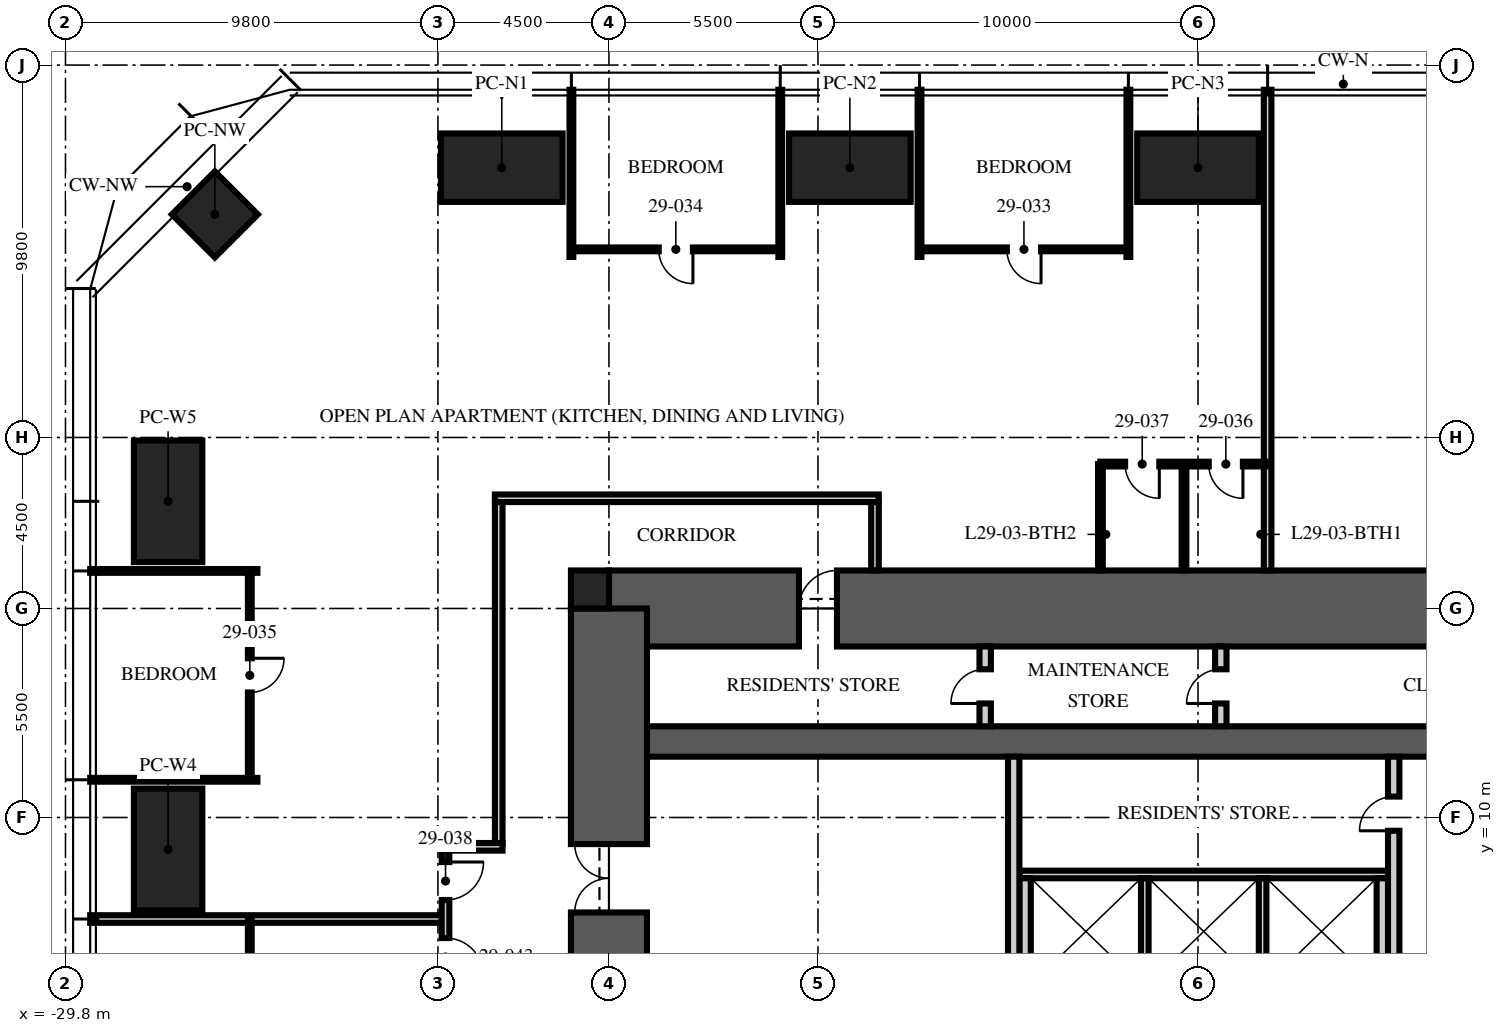
"""IFC4 building model, lengths in metres.
Left out: names, types, materials, properties, quantities, classifications, styles, units other than length and angle.
Written with IfcOpenShell. Run it as: python <this file> out.ifc"""

import sys

from ifc_helpers import new_model, si_unit, direction, frame, frame_2d, origin, origin_2d, place, context, subcontext, project, spatial, rectangle, hollow_rectangle, extrude, element, fill, save


model = new_model("IFC4")
c1 = context("Model", 3, precision=1e-05, world=origin(), true_north=direction((0.0, 1.0)))
c2 = subcontext(c1, "Body", "Model", "MODEL_VIEW")
j1 = project(units=[si_unit("LENGTHUNIT", "METRE"), si_unit("PLANEANGLEUNIT", "RADIAN")], contexts=[c1])
p1 = place(None, origin())
s1 = spatial("IfcSite", under=j1, at=p1, CompositionType="ELEMENT")
p2 = place(p1, origin())
s2 = spatial("IfcBuilding", under=s1, at=p2, CompositionType="ELEMENT")
p3 = place(p2, frame((0.0, 0.0, 118.5)))
s3 = spatial("IfcBuildingStorey", under=s2, at=p3, CompositionType="ELEMENT", Elevation=118.5)
p4 = place(p3, frame((-15.5, 15.5, -0.25), z_axis=(0.0, 0.0, 1.0), x_axis=(1.0, 0.0, 0.0)))
e1 = element("IfcWall", 1, at=p4, inside=s3, PredefinedType="SHEAR", context=c2, shape_type="SweptSolid", body=[
    extrude(rectangle(XDim=31.0, YDim=2.0, at=frame_2d((15.5, 0.0))), origin(), (0.0, 0.0, 1.0), 3.75),
])
p5 = place(p4, frame((5.0, 0.0, 0.25)))
e2 = element("IfcOpeningElement", 2, at=p5, cuts=e1, PredefinedType="OPENING", context=c2, shape_type="SweptSolid", body=[
    extrude(rectangle(XDim=1.0, YDim=2.1, at=frame_2d((0.5, 1.05))), frame((0.0, 1.01, 0.0), z_axis=(0.0, -1.0, 0.0), x_axis=(1.0, 0.0, 0.0)), (0.0, 0.0, 1.0), 2.02),
])
p6 = place(p3, frame((-15.5, 12.0, -0.25), z_axis=(0.0, 0.0, 1.0), x_axis=(1.0, 0.0, 0.0)))
e3 = element("IfcWall", 3, at=p6, inside=s3, PredefinedType="SHEAR", context=c2, shape_type="SweptSolid", body=[
    extrude(rectangle(XDim=31.0, YDim=0.8, at=frame_2d((15.5, 0.0))), origin(), (0.0, 0.0, 1.0), 3.75),
])
p7 = place(p3, frame((-15.5, -15.5, -0.25), z_axis=(0.0, 0.0, 1.0), x_axis=(0.0, 1.0, 0.0)))
e4 = element("IfcWall", 4, at=p7, inside=s3, PredefinedType="SHEAR", context=c2, shape_type="SweptSolid", body=[
    extrude(rectangle(XDim=31.0, YDim=2.0, at=frame_2d((15.5, 0.0))), origin(), (0.0, 0.0, 1.0), 3.75),
])
p8 = place(p7, frame((6.5, 0.0, 0.25)))
e5 = element("IfcOpeningElement", 5, at=p8, cuts=e4, PredefinedType="OPENING", context=c2, shape_type="SweptSolid", body=[
    extrude(rectangle(XDim=1.2, YDim=2.1, at=frame_2d((0.6, 1.05))), frame((0.0, 1.01, 0.0), z_axis=(0.0, -1.0, 0.0), x_axis=(1.0, 0.0, 0.0)), (0.0, 0.0, 1.0), 2.02),
])
p9 = place(p7, frame((23.0, 0.0, 0.25)))
e6 = element("IfcOpeningElement", 6, at=p9, cuts=e4, PredefinedType="OPENING", context=c2, shape_type="SweptSolid", body=[
    extrude(rectangle(XDim=1.8, YDim=2.1, at=frame_2d((0.9, 1.05))), frame((0.0, 1.01, 0.0), z_axis=(0.0, -1.0, 0.0), x_axis=(1.0, 0.0, 0.0)), (0.0, 0.0, 1.0), 2.02),
])
p10 = place(p3, frame((-16.0, 16.0, -0.25), z_axis=(0.0, 0.0, 1.0), x_axis=(1.0, 0.0, 0.0)))
e7 = element("IfcColumn", 7, at=p10, inside=s3, PredefinedType="COLUMN", context=c2, shape_type="SweptSolid", body=[
    extrude(rectangle(XDim=1.0, YDim=1.0, at=origin_2d()), origin(), (0.0, 0.0, 1.0), 3.75),
])
for number, where, z_axis, x_axis in (
    (8, (-18.32, 27.1, 0.0), (0.0, 0.0, 1.0), (1.0, 0.0, 0.0)),
    (9, (-9.16, 27.1, 0.0), (0.0, 0.0, 1.0), (1.0, 0.0, 0.0)),
    (10, (0.0, 27.1, 0.0), (0.0, 0.0, 1.0), (1.0, 0.0, 0.0)),
    (11, (-27.1, 9.16, 0.0), (0.0, 0.0, 1.0), (0.0, 1.0, 0.0)),
    (12, (-27.1, 18.32, 0.0), (0.0, 0.0, 1.0), (0.0, 1.0, 0.0)),
):
    element("IfcColumn", number, at=place(p3, frame(where, z_axis=z_axis, x_axis=x_axis)), inside=s3, PredefinedType="COLUMN", context=c2, shape_type="SweptSolid", body=[
        extrude(hollow_rectangle(XDim=3.2, YDim=1.8, WallThickness=0.2, at=origin_2d()), origin(), (0.0, 0.0, 1.0), 3.75),
    ])
p11 = place(p3, frame((-25.87, 25.87, 0.0), z_axis=(0.0, 0.0, 1.0), x_axis=(0.707106781187, 0.707106781187, 0.0)))
e13 = element("IfcColumn", 13, at=p11, inside=s3, PredefinedType="COLUMN", context=c2, shape_type="SweptSolid", body=[
    extrude(hollow_rectangle(XDim=1.6, YDim=1.6, WallThickness=0.1, at=origin_2d()), origin(), (0.0, 0.0, 1.0), 3.75),
])
p12 = place(p3, frame((-4.7, 8.5, 0.0), z_axis=(0.0, 0.0, 1.0), x_axis=(1.0, 0.0, 0.0)))
e14 = element("IfcWall", 14, at=p12, inside=s3, PredefinedType="PARTITIONING", context=c2, shape_type="SweptSolid", body=[
    extrude(rectangle(XDim=9.7, YDim=0.2, at=frame_2d((4.85, 0.0))), origin(), (0.0, 0.0, 1.0), 3.5),
])
for number, where, z_axis, x_axis in (
    (15, (-4.55, 5.6, 0.0), (0.0, 0.0, 1.0), (0.0, 1.0, 0.0)),
    (16, (4.85, 5.6, 0.0), (0.0, 0.0, 1.0), (0.0, 1.0, 0.0)),
):
    element("IfcWall", number, at=place(p3, frame(where, z_axis=z_axis, x_axis=x_axis)), inside=s3, PredefinedType="PARTITIONING", context=c2, shape_type="SweptSolid", body=[
        extrude(rectangle(XDim=2.8, YDim=0.3, at=frame_2d((1.4, 0.0))), origin(), (0.0, 0.0, 1.0), 3.5),
    ])
for number, where, z_axis, x_axis in (
    (17, (-1.4, 5.6, 0.0), (0.0, 0.0, 1.0), (0.0, 1.0, 0.0)),
    (18, (1.7, 5.6, 0.0), (0.0, 0.0, 1.0), (0.0, 1.0, 0.0)),
):
    element("IfcWall", number, at=place(p3, frame(where, z_axis=z_axis, x_axis=x_axis)), inside=s3, PredefinedType="PARTITIONING", context=c2, shape_type="SweptSolid", body=[
        extrude(rectangle(XDim=2.8, YDim=0.2, at=frame_2d((1.4, 0.0))), origin(), (0.0, 0.0, 1.0), 3.5),
    ])
p13 = place(p3, frame((-4.85, 5.3, 0.0), z_axis=(0.0, 0.0, 1.0), x_axis=(0.0, 1.0, 0.0)))
e19 = element("IfcWall", 19, at=p13, inside=s3, PredefinedType="PARTITIONING", context=c2, shape_type="SweptSolid", body=[
    extrude(rectangle(XDim=6.3, YDim=0.3, at=frame_2d((3.15, 0.0))), origin(), (0.0, 0.0, 1.0), 3.5),
])
p14 = place(p3, frame((5.15, 5.3, 0.0), z_axis=(0.0, 0.0, 1.0), x_axis=(0.0, 1.0, 0.0)))
e20 = element("IfcWall", 20, at=p14, inside=s3, PredefinedType="PARTITIONING", context=c2, shape_type="SweptSolid", body=[
    extrude(rectangle(XDim=6.3, YDim=0.3, at=frame_2d((3.15, 0.0))), origin(), (0.0, 0.0, 1.0), 3.5),
])
p15 = place(p14, frame((4.35, 0.0, 0.0)))
e21 = element("IfcOpeningElement", 21, at=p15, cuts=e20, PredefinedType="OPENING", context=c2, shape_type="SweptSolid", body=[
    extrude(rectangle(XDim=0.9, YDim=2.1, at=frame_2d((0.45, 1.05))), frame((0.0, 0.16, 0.0), z_axis=(0.0, -1.0, 0.0), x_axis=(1.0, 0.0, 0.0)), (0.0, 0.0, 1.0), 0.32),
])
p16 = place(p3, frame((-5.6, 12.4, 0.0), z_axis=(0.0, 0.0, 1.0), x_axis=(0.0, 1.0, 0.0)))
e22 = element("IfcWall", 22, at=p16, inside=s3, PredefinedType="PARTITIONING", context=c2, shape_type="SweptSolid", body=[
    extrude(rectangle(XDim=2.1, YDim=0.3, at=frame_2d((1.05, 0.0))), origin(), (0.0, 0.0, 1.0), 3.5),
])
p17 = place(p16, frame((0.6, 0.0, 0.0)))
e23 = element("IfcOpeningElement", 23, at=p17, cuts=e22, PredefinedType="OPENING", context=c2, shape_type="SweptSolid", body=[
    extrude(rectangle(XDim=0.9, YDim=2.1, at=frame_2d((0.45, 1.05))), frame((0.0, 0.16, 0.0), z_axis=(0.0, -1.0, 0.0), x_axis=(1.0, 0.0, 0.0)), (0.0, 0.0, 1.0), 0.32),
])
p18 = place(p3, frame((0.6, 12.4, 0.0), z_axis=(0.0, 0.0, 1.0), x_axis=(0.0, 1.0, 0.0)))
e24 = element("IfcWall", 24, at=p18, inside=s3, PredefinedType="PARTITIONING", context=c2, shape_type="SweptSolid", body=[
    extrude(rectangle(XDim=2.1, YDim=0.3, at=frame_2d((1.05, 0.0))), origin(), (0.0, 0.0, 1.0), 3.5),
])
p19 = place(p18, frame((0.6, 0.0, 0.0)))
e25 = element("IfcOpeningElement", 25, at=p19, cuts=e24, PredefinedType="OPENING", context=c2, shape_type="SweptSolid", body=[
    extrude(rectangle(XDim=0.9, YDim=2.1, at=frame_2d((0.45, 1.05))), frame((0.0, 0.16, 0.0), z_axis=(0.0, -1.0, 0.0), x_axis=(1.0, 0.0, 0.0)), (0.0, 0.0, 1.0), 0.32),
])
p20 = place(p3, frame((-18.5, 18.4, 0.0), z_axis=(0.0, 0.0, 1.0), x_axis=(1.0, 0.0, 0.0)))
e26 = element("IfcWall", 26, at=p20, inside=s3, PredefinedType="PARTITIONING", context=c2, shape_type="SweptSolid", body=[
    extrude(rectangle(XDim=10.1, YDim=0.2, at=frame_2d((5.05, 0.0))), origin(), (0.0, 0.0, 1.0), 2.3),
])
p21 = place(p3, frame((-8.5, 18.3, 0.0), z_axis=(0.0, 0.0, 1.0), x_axis=(0.0, -1.0, 0.0)))
e27 = element("IfcWall", 27, at=p21, inside=s3, PredefinedType="PARTITIONING", context=c2, shape_type="SweptSolid", body=[
    extrude(rectangle(XDim=1.8, YDim=0.2, at=frame_2d((0.9, 0.0))), origin(), (0.0, 0.0, 1.0), 3.5),
])
p22 = place(p3, frame((1.832, 16.5, 0.0), z_axis=(0.0, 0.0, 1.0), x_axis=(0.0, 1.0, 0.0)))
e28 = element("IfcWall", 28, at=p22, inside=s3, PredefinedType="PARTITIONING", context=c2, shape_type="SweptSolid", body=[
    extrude(rectangle(XDim=12.65, YDim=0.2, at=frame_2d((6.325, 0.0))), origin(), (0.0, 0.0, 1.0), 2.81),
])
for number, where, z_axis, x_axis in (
    (29, (-1.832, 24.75, 0.0), (0.0, 0.0, 1.0), (0.0, 1.0, 0.0)),
    (30, (-7.328, 24.75, 0.0), (0.0, 0.0, 1.0), (0.0, 1.0, 0.0)),
    (31, (-10.992, 24.75, 0.0), (0.0, 0.0, 1.0), (0.0, 1.0, 0.0)),
    (32, (-16.488, 24.75, 0.0), (0.0, 0.0, 1.0), (0.0, 1.0, 0.0)),
    (33, (-24.75, 16.488, 0.0), (0.0, 0.0, 1.0), (-1.0, 0.0, 0.0)),
    (34, (-24.75, 10.992, 0.0), (0.0, 0.0, 1.0), (-1.0, 0.0, 0.0)),
):
    element("IfcWall", number, at=place(p3, frame(where, z_axis=z_axis, x_axis=x_axis)), inside=s3, PredefinedType="PARTITIONING", context=c2, shape_type="SweptSolid", body=[
        extrude(rectangle(XDim=4.4, YDim=0.1, at=frame_2d((2.2, 0.0))), origin(), (0.0, 0.0, 1.0), 2.81),
    ])
p23 = place(p3, frame((-19.9, 7.328, 0.0), z_axis=(0.0, 0.0, 1.0), x_axis=(-1.0, 0.0, 0.0)))
e35 = element("IfcWall", 35, at=p23, inside=s3, PredefinedType="PARTITIONING", context=c2, shape_type="SweptSolid", body=[
    extrude(rectangle(XDim=9.25, YDim=0.2, at=frame_2d((4.625, 0.0))), origin(), (0.0, 0.0, 1.0), 2.81),
])
p24 = place(p3, frame((-1.832, 24.95, 0.0), z_axis=(0.0, 0.0, 1.0), x_axis=(-1.0, 0.0, 0.0)))
e36 = element("IfcWall", 36, at=p24, inside=s3, PredefinedType="PARTITIONING", context=c2, shape_type="SweptSolid", body=[
    extrude(rectangle(XDim=5.496, YDim=0.1, at=frame_2d((2.748, 0.0))), origin(), (0.0, 0.0, 1.0), 2.81),
])
p25 = place(p24, frame((2.298, 0.0, 0.0)))
e37 = element("IfcOpeningElement", 37, at=p25, cuts=e36, PredefinedType="OPENING", context=c2, shape_type="SweptSolid", body=[
    extrude(rectangle(XDim=0.9, YDim=2.1, at=frame_2d((0.45, 1.05))), frame((0.0, 0.06, 0.0), z_axis=(0.0, -1.0, 0.0), x_axis=(1.0, 0.0, 0.0)), (0.0, 0.0, 1.0), 0.12),
])
p26 = place(p3, frame((-10.992, 24.95, 0.0), z_axis=(0.0, 0.0, 1.0), x_axis=(-1.0, 0.0, 0.0)))
e38 = element("IfcWall", 38, at=p26, inside=s3, PredefinedType="PARTITIONING", context=c2, shape_type="SweptSolid", body=[
    extrude(rectangle(XDim=5.496, YDim=0.1, at=frame_2d((2.748, 0.0))), origin(), (0.0, 0.0, 1.0), 2.81),
])
p27 = place(p26, frame((2.298, 0.0, 0.0)))
e39 = element("IfcOpeningElement", 39, at=p27, cuts=e38, PredefinedType="OPENING", context=c2, shape_type="SweptSolid", body=[
    extrude(rectangle(XDim=0.9, YDim=2.1, at=frame_2d((0.45, 1.05))), frame((0.0, 0.06, 0.0), z_axis=(0.0, -1.0, 0.0), x_axis=(1.0, 0.0, 0.0)), (0.0, 0.0, 1.0), 0.12),
])
p28 = place(p3, frame((-24.95, 16.488, 0.0), z_axis=(0.0, 0.0, 1.0), x_axis=(0.0, -1.0, 0.0)))
e40 = element("IfcWall", 40, at=p28, inside=s3, PredefinedType="PARTITIONING", context=c2, shape_type="SweptSolid", body=[
    extrude(rectangle(XDim=5.496, YDim=0.1, at=frame_2d((2.748, 0.0))), origin(), (0.0, 0.0, 1.0), 2.81),
])
p29 = place(p28, frame((2.298, 0.0, 0.0)))
e41 = element("IfcOpeningElement", 41, at=p29, cuts=e40, PredefinedType="OPENING", context=c2, shape_type="SweptSolid", body=[
    extrude(rectangle(XDim=0.9, YDim=2.1, at=frame_2d((0.45, 1.05))), frame((0.0, 0.06, 0.0), z_axis=(0.0, -1.0, 0.0), x_axis=(1.0, 0.0, 0.0)), (0.0, 0.0, 1.0), 0.12),
])
p30 = place(p3, frame((1.832, 19.3, 0.0), z_axis=(0.0, 0.0, 1.0), x_axis=(-1.0, 0.0, 0.0)))
e42 = element("IfcWall", 42, at=p30, inside=s3, PredefinedType="PARTITIONING", context=c2, shape_type="SweptSolid", body=[
    extrude(rectangle(XDim=4.4, YDim=0.125, at=frame_2d((2.2, 0.0))), origin(), (0.0, 0.0, 1.0), 2.7),
])
p31 = place(p30, frame((0.65, 0.0, 0.0)))
e43 = element("IfcOpeningElement", 43, at=p31, cuts=e42, PredefinedType="OPENING", context=c2, shape_type="SweptSolid", body=[
    extrude(rectangle(XDim=0.9, YDim=2.1, at=frame_2d((0.45, 1.05))), frame((0.0, 0.073, 0.0), z_axis=(0.0, -1.0, 0.0), x_axis=(1.0, 0.0, 0.0)), (0.0, 0.0, 1.0), 0.145),
])
p32 = place(p30, frame((2.85, 0.0, 0.0)))
e44 = element("IfcOpeningElement", 44, at=p32, cuts=e42, PredefinedType="OPENING", context=c2, shape_type="SweptSolid", body=[
    extrude(rectangle(XDim=0.9, YDim=2.1, at=frame_2d((0.45, 1.05))), frame((0.0, 0.073, 0.0), z_axis=(0.0, -1.0, 0.0), x_axis=(1.0, 0.0, 0.0)), (0.0, 0.0, 1.0), 0.145),
])
for number, where, z_axis, x_axis in (
    (45, (-0.368, 16.5, 0.0), (0.0, 0.0, 1.0), (0.0, 1.0, 0.0)),
    (46, (-2.568, 16.5, 0.0), (0.0, 0.0, 1.0), (0.0, 1.0, 0.0)),
):
    element("IfcWall", number, at=place(p3, frame(where, z_axis=z_axis, x_axis=x_axis)), inside=s3, PredefinedType="PARTITIONING", context=c2, shape_type="SweptSolid", body=[
        extrude(rectangle(XDim=2.8, YDim=0.125, at=frame_2d((1.4, 0.0))), origin(), (0.0, 0.0, 1.0), 3.5),
    ])
p33 = place(p3, frame((-24.95, 7.328, 0.0), z_axis=(0.0, 0.0, 1.0), x_axis=(0.0, -1.0, 0.0)))
e47 = element("IfcWall", 47, at=p33, inside=s3, PredefinedType="PARTITIONING", context=c2, shape_type="SweptSolid", body=[
    extrude(rectangle(XDim=5.496, YDim=0.1, at=frame_2d((2.748, 0.0))), origin(), (0.0, 0.0, 1.0), 2.81),
])
p34 = place(p33, frame((2.298, 0.0, 0.0)))
e48 = element("IfcOpeningElement", 48, at=p34, cuts=e47, PredefinedType="OPENING", context=c2, shape_type="SweptSolid", body=[
    extrude(rectangle(XDim=0.9, YDim=2.1, at=frame_2d((0.45, 1.05))), frame((0.0, 0.06, 0.0), z_axis=(0.0, -1.0, 0.0), x_axis=(1.0, 0.0, 0.0)), (0.0, 0.0, 1.0), 0.12),
])
p35 = place(p3, frame((-18.4, 18.3, 0.0), z_axis=(0.0, 0.0, 1.0), x_axis=(0.0, -1.0, 0.0)))
e49 = element("IfcWall", 49, at=p35, inside=s3, PredefinedType="PARTITIONING", context=c2, shape_type="SweptSolid", body=[
    extrude(rectangle(XDim=8.972, YDim=0.2, at=frame_2d((4.486, 0.0))), origin(), (0.0, 0.0, 1.0), 2.3),
])
p36 = place(p3, frame((-18.3, 9.228, 0.0), z_axis=(0.0, 0.0, 1.0), x_axis=(-1.0, 0.0, 0.0)))
e50 = element("IfcWall", 50, at=p36, inside=s3, PredefinedType="PARTITIONING", context=c2, shape_type="SweptSolid", body=[
    extrude(rectangle(XDim=1.6, YDim=0.2, at=frame_2d((0.8, 0.0))), origin(), (0.0, 0.0, 1.0), 2.7),
])
p37 = place(p3, frame((-19.8, 9.128, 0.0), z_axis=(0.0, 0.0, 1.0), x_axis=(0.0, -1.0, 0.0)))
e51 = element("IfcWall", 51, at=p37, inside=s3, PredefinedType="PARTITIONING", context=c2, shape_type="SweptSolid", body=[
    extrude(rectangle(XDim=3.6, YDim=0.2, at=frame_2d((1.8, 0.0))), origin(), (0.0, 0.0, 1.0), 2.7),
])
p38 = place(p37, frame((0.3, 0.0, 0.0)))
e52 = element("IfcOpeningElement", 52, at=p38, cuts=e51, PredefinedType="OPENING", context=c2, shape_type="SweptSolid", body=[
    extrude(rectangle(XDim=1.0, YDim=2.2, at=frame_2d((0.5, 1.1))), frame((0.0, 0.11, 0.0), z_axis=(0.0, -1.0, 0.0), x_axis=(1.0, 0.0, 0.0)), (0.0, 0.0, 1.0), 0.22),
])
p39 = place(p37, frame((2.3, 0.0, 0.0)))
e53 = element("IfcOpeningElement", 53, at=p39, cuts=e51, PredefinedType="OPENING", context=c2, shape_type="SweptSolid", body=[
    extrude(rectangle(XDim=1.0, YDim=2.2, at=frame_2d((0.5, 1.1))), frame((0.0, 0.11, 0.0), z_axis=(0.0, -1.0, 0.0), x_axis=(1.0, 0.0, 0.0)), (0.0, 0.0, 1.0), 0.22),
])
p40 = place(p9, origin())
e54 = element("IfcDoor", 54, at=p40, inside=s3, OperationType="DOUBLE_DOOR_SINGLE_SWING", PredefinedType="DOOR", context=c2, shape_type="SweptSolid", body=[
    extrude(rectangle(XDim=1.8, YDim=2.1, at=frame_2d((0.9, 1.05))), frame((0.0, 0.025, 0.0), z_axis=(0.0, -1.0, 0.0), x_axis=(1.0, 0.0, 0.0)), (0.0, 0.0, 1.0), 0.05),
])
fill(e6, e54)
p41 = place(p15, origin())
e55 = element("IfcDoor", 55, at=p41, inside=s3, OperationType="SINGLE_SWING_LEFT", PredefinedType="DOOR", context=c2, shape_type="SweptSolid", body=[
    extrude(rectangle(XDim=0.9, YDim=2.1, at=frame_2d((0.45, 1.05))), frame((0.0, 0.025, 0.0), z_axis=(0.0, -1.0, 0.0), x_axis=(1.0, 0.0, 0.0)), (0.0, 0.0, 1.0), 0.05),
])
fill(e21, e55)
p42 = place(p17, origin())
e56 = element("IfcDoor", 56, at=p42, inside=s3, OperationType="SINGLE_SWING_LEFT", PredefinedType="DOOR", context=c2, shape_type="SweptSolid", body=[
    extrude(rectangle(XDim=0.9, YDim=2.1, at=frame_2d((0.45, 1.05))), frame((0.0, 0.025, 0.0), z_axis=(0.0, -1.0, 0.0), x_axis=(1.0, 0.0, 0.0)), (0.0, 0.0, 1.0), 0.05),
])
fill(e23, e56)
p43 = place(p19, origin())
e57 = element("IfcDoor", 57, at=p43, inside=s3, OperationType="SINGLE_SWING_LEFT", PredefinedType="DOOR", context=c2, shape_type="SweptSolid", body=[
    extrude(rectangle(XDim=0.9, YDim=2.1, at=frame_2d((0.45, 1.05))), frame((0.0, 0.025, 0.0), z_axis=(0.0, -1.0, 0.0), x_axis=(1.0, 0.0, 0.0)), (0.0, 0.0, 1.0), 0.05),
])
fill(e25, e57)
p44 = place(p5, origin())
e58 = element("IfcDoor", 58, at=p44, inside=s3, OperationType="SINGLE_SWING_RIGHT", PredefinedType="DOOR", context=c2, shape_type="SweptSolid", body=[
    extrude(rectangle(XDim=1.0, YDim=2.1, at=frame_2d((0.5, 1.05))), frame((0.0, 0.025, 0.0), z_axis=(0.0, -1.0, 0.0), x_axis=(1.0, 0.0, 0.0)), (0.0, 0.0, 1.0), 0.05),
])
fill(e2, e58)
p45 = place(p25, origin())
e59 = element("IfcDoor", 59, at=p45, inside=s3, OperationType="SINGLE_SWING_LEFT", PredefinedType="DOOR", context=c2, shape_type="SweptSolid", body=[
    extrude(rectangle(XDim=0.9, YDim=2.1, at=frame_2d((0.45, 1.05))), frame((0.0, 0.025, 0.0), z_axis=(0.0, -1.0, 0.0), x_axis=(1.0, 0.0, 0.0)), (0.0, 0.0, 1.0), 0.05),
])
fill(e37, e59)
p46 = place(p27, origin())
e60 = element("IfcDoor", 60, at=p46, inside=s3, OperationType="SINGLE_SWING_LEFT", PredefinedType="DOOR", context=c2, shape_type="SweptSolid", body=[
    extrude(rectangle(XDim=0.9, YDim=2.1, at=frame_2d((0.45, 1.05))), frame((0.0, 0.025, 0.0), z_axis=(0.0, -1.0, 0.0), x_axis=(1.0, 0.0, 0.0)), (0.0, 0.0, 1.0), 0.05),
])
fill(e39, e60)
p47 = place(p29, origin())
e61 = element("IfcDoor", 61, at=p47, inside=s3, OperationType="SINGLE_SWING_LEFT", PredefinedType="DOOR", context=c2, shape_type="SweptSolid", body=[
    extrude(rectangle(XDim=0.9, YDim=2.1, at=frame_2d((0.45, 1.05))), frame((0.0, 0.025, 0.0), z_axis=(0.0, -1.0, 0.0), x_axis=(1.0, 0.0, 0.0)), (0.0, 0.0, 1.0), 0.05),
])
fill(e41, e61)
p48 = place(p31, origin())
e62 = element("IfcDoor", 62, at=p48, inside=s3, OperationType="SINGLE_SWING_LEFT", PredefinedType="DOOR", context=c2, shape_type="SweptSolid", body=[
    extrude(rectangle(XDim=0.9, YDim=2.1, at=frame_2d((0.45, 1.05))), frame((0.0, 0.025, 0.0), z_axis=(0.0, -1.0, 0.0), x_axis=(1.0, 0.0, 0.0)), (0.0, 0.0, 1.0), 0.05),
])
fill(e43, e62)
p49 = place(p32, origin())
e63 = element("IfcDoor", 63, at=p49, inside=s3, OperationType="SINGLE_SWING_LEFT", PredefinedType="DOOR", context=c2, shape_type="SweptSolid", body=[
    extrude(rectangle(XDim=0.9, YDim=2.1, at=frame_2d((0.45, 1.05))), frame((0.0, 0.025, 0.0), z_axis=(0.0, -1.0, 0.0), x_axis=(1.0, 0.0, 0.0)), (0.0, 0.0, 1.0), 0.05),
])
fill(e44, e63)
p50 = place(p38, origin())
e64 = element("IfcDoor", 64, at=p50, inside=s3, OperationType="SINGLE_SWING_LEFT", PredefinedType="DOOR", context=c2, shape_type="SweptSolid", body=[
    extrude(rectangle(XDim=1.0, YDim=2.2, at=frame_2d((0.5, 1.1))), frame((0.0, 0.025, 0.0), z_axis=(0.0, -1.0, 0.0), x_axis=(1.0, 0.0, 0.0)), (0.0, 0.0, 1.0), 0.05),
])
fill(e52, e64)
p51 = place(p39, origin())
e65 = element("IfcDoor", 65, at=p51, inside=s3, OperationType="SINGLE_SWING_RIGHT", PredefinedType="DOOR", context=c2, shape_type="SweptSolid", body=[
    extrude(rectangle(XDim=1.0, YDim=2.2, at=frame_2d((0.5, 1.1))), frame((0.0, 0.025, 0.0), z_axis=(0.0, -1.0, 0.0), x_axis=(1.0, 0.0, 0.0)), (0.0, 0.0, 1.0), 0.05),
])
fill(e53, e65)
save(model, sys.argv[1])
